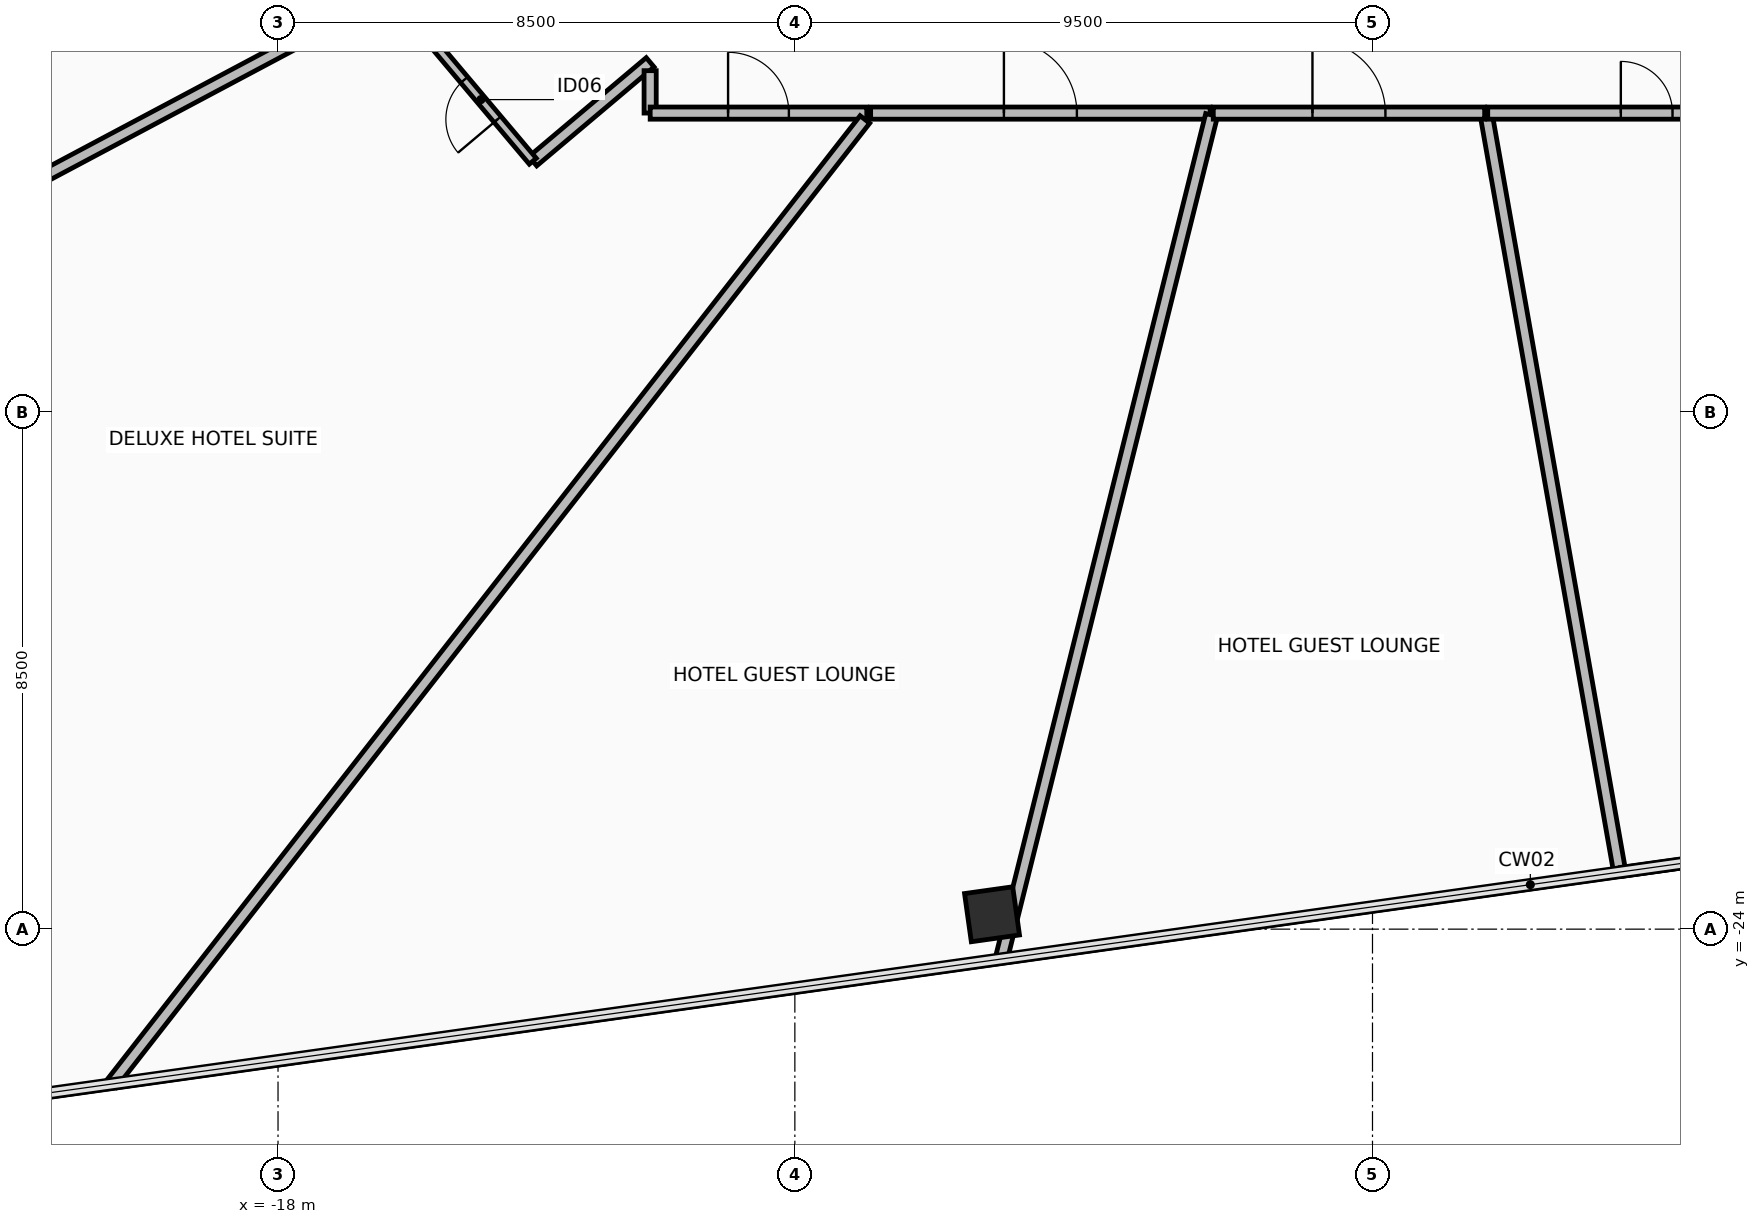
"""IFC4 building model, lengths in metres.
Left out: names, types, materials, properties, quantities, classifications, styles, units other than length and angle.
Written with IfcOpenShell. Run it as: python <this file> out.ifc"""

import sys

from ifc_helpers import new_model, si_unit, direction, frame, frame_2d, origin, origin_2d, place, context, subcontext, project, spatial, rectangle, hollow_rectangle, extrude, element, fill, save


model = new_model("IFC4")
c1 = context("Model", 3, precision=1e-05, world=origin(), true_north=direction((0.0, 1.0)))
c2 = subcontext(c1, "Body", "Model", "MODEL_VIEW")
j1 = project(units=[si_unit("LENGTHUNIT", "METRE"), si_unit("PLANEANGLEUNIT", "RADIAN")], contexts=[c1])
p1 = place(None, origin())
s1 = spatial("IfcSite", under=j1, at=p1, CompositionType="ELEMENT")
p2 = place(p1, origin())
s2 = spatial("IfcBuilding", under=s1, at=p2, CompositionType="ELEMENT")
p3 = place(p2, frame((0.0, 0.0, 77.65)))
s3 = spatial("IfcBuildingStorey", under=s2, at=p3, CompositionType="ELEMENT", Elevation=77.65)
p4 = place(p3, frame((-6.257, -23.755, 0.0), z_axis=(0.0, 0.0, 1.0), x_axis=(0.990268068742, 0.13917310096, 0.0)))
e1 = element("IfcColumn", 1, at=p4, inside=s3, PredefinedType="COLUMN", context=c2, shape_type="SweptSolid", body=[
    extrude(hollow_rectangle(XDim=0.8, YDim=0.8, WallThickness=0.045, at=origin_2d()), origin(), (0.0, 0.0, 1.0), 3.45),
])
p5 = place(p3, frame((-11.88, -9.745, 0.0), z_axis=(0.0, 0.0, 1.0), x_axis=(-0.764712982519, -0.644371053328, 0.0)))
e2 = element("IfcWall", 2, at=p5, inside=s3, PredefinedType="PARTITIONING", context=c2, shape_type="SweptSolid", body=[
    extrude(rectangle(XDim=2.524, YDim=0.2, at=frame_2d((1.262, 0.0))), origin(), (0.0, 0.0, 1.0), 3.21),
])
p6 = place(p3, frame((-13.81, -11.371, 0.0), z_axis=(0.0, 0.0, 1.0), x_axis=(-0.644478981733, 0.764622025647, 0.0)))
e3 = element("IfcWall", 3, at=p6, inside=s3, PredefinedType="PARTITIONING", context=c2, shape_type="SweptSolid", body=[
    extrude(rectangle(XDim=2.65, YDim=0.15, at=frame_2d((1.325, 0.0))), origin(), (0.0, 0.0, 1.0), 2.805),
])
p7 = place(p6, frame((0.9, 0.0, 0.0)))
e4 = element("IfcOpeningElement", 4, at=p7, cuts=e3, PredefinedType="OPENING", context=c2, shape_type="SweptSolid", body=[
    extrude(rectangle(XDim=0.85, YDim=2.1, at=frame_2d((0.425, 1.05))), frame((0.0, 0.085, 0.0), z_axis=(0.0, -1.0, 0.0), x_axis=(1.0, 0.0, 0.0)), (0.0, 0.0, 1.0), 0.17),
])
p8 = place(p3, frame((-11.893, -6.324, 0.0), z_axis=(0.0, 0.0, 1.0), x_axis=(-0.882946043117, -0.469474477416, 0.0)))
e5 = element("IfcWall", 5, at=p8, inside=s3, PredefinedType="PARTITIONING", context=c2, shape_type="SweptSolid", body=[
    extrude(rectangle(XDim=12.747, YDim=0.2, at=frame_2d((6.374, 0.0))), origin(), (0.0, 0.0, 1.0), 2.405),
])
p9 = place(p3, frame((-23.087, -12.156, 0.0), z_axis=(0.0, 0.0, 1.0), x_axis=(0.374605375648, 0.927184346576, 0.0)))
e6 = element("IfcWall", 6, at=p9, inside=s3, PredefinedType="PARTITIONING", context=c2, shape_type="SweptSolid", body=[
    extrude(rectangle(XDim=11.685, YDim=0.15, at=frame_2d((5.842, 0.0))), origin(), (0.0, 0.0, 1.0), 3.21),
])
p10 = place(p3, frame((4.062, -23.038, 0.0), z_axis=(0.0, 0.0, 1.0), x_axis=(-0.173658422676, 0.984805946486, 0.0)))
e7 = element("IfcWall", 7, at=p10, inside=s3, PredefinedType="PARTITIONING", context=c2, shape_type="SweptSolid", body=[
    extrude(rectangle(XDim=12.62, YDim=0.2, at=frame_2d((6.31, 0.0))), origin(), (0.0, 0.0, 1.0), 2.405),
])
p11 = place(p3, frame((1.895, -10.58, 0.0), z_axis=(0.0, 0.0, 1.0), x_axis=(1.0, 0.0, 0.0)))
e8 = element("IfcWall", 8, at=p11, inside=s3, PredefinedType="PARTITIONING", context=c2, shape_type="SweptSolid", body=[
    extrude(rectangle(XDim=5.228, YDim=0.2, at=frame_2d((2.614, 0.0))), origin(), (0.0, 0.0, 1.0), 3.21),
])
p12 = place(p11, frame((2.189, 0.0, 0.0)))
e9 = element("IfcOpeningElement", 9, at=p12, cuts=e8, PredefinedType="OPENING", context=c2, shape_type="SweptSolid", body=[
    extrude(rectangle(XDim=0.85, YDim=2.1, at=frame_2d((0.425, 1.05))), frame((0.0, 0.11, 0.0), z_axis=(0.0, -1.0, 0.0), x_axis=(1.0, 0.0, 0.0)), (0.0, 0.0, 1.0), 0.22),
])
p13 = place(p3, frame((14.445, -21.603, 0.0), z_axis=(0.0, 0.0, 1.0), x_axis=(-0.990270056923, -0.139158953581, 0.0)))
e10 = element("IfcWall", 10, at=p13, inside=s3, PredefinedType="PARTITIONING", context=c2, shape_type="SweptSolid", body=[
    extrude(rectangle(XDim=10.456, YDim=0.15, at=frame_2d((5.228, 0.0))), origin(), (0.0, 0.0, 1.0), 3.21),
])
p14 = place(p3, frame((-11.88, -9.882, 0.0), z_axis=(0.0, 0.0, 1.0), x_axis=(0.0, -1.0, 0.0)))
e11 = element("IfcWall", 11, at=p14, inside=s3, PredefinedType="PARTITIONING", context=c2, shape_type="SweptSolid", body=[
    extrude(rectangle(XDim=0.697, YDim=0.2, at=frame_2d((0.349, 0.0))), origin(), (0.0, 0.0, 1.0), 2.605),
])
p15 = place(p3, frame((-11.879, -10.58, 0.0), z_axis=(0.0, 0.0, 1.0), x_axis=(1.0, 0.0, 0.0)))
e12 = element("IfcWall", 12, at=p15, inside=s3, PredefinedType="PARTITIONING", context=c2, shape_type="SweptSolid", body=[
    extrude(rectangle(XDim=3.562, YDim=0.2, at=frame_2d((1.781, 0.0))), origin(), (0.0, 0.0, 1.0), 2.605),
])
p16 = place(p15, frame((1.281, 0.0, 0.0)))
e13 = element("IfcOpeningElement", 13, at=p16, cuts=e12, PredefinedType="OPENING", context=c2, shape_type="SweptSolid", body=[
    extrude(rectangle(XDim=1.0, YDim=2.15, at=frame_2d((0.5, 1.075))), frame((0.0, 0.11, 0.0), z_axis=(0.0, -1.0, 0.0), x_axis=(1.0, 0.0, 0.0)), (0.0, 0.0, 1.0), 0.22),
])
p17 = place(p3, frame((-8.348, -10.685, 0.0), z_axis=(0.0, 0.0, 1.0), x_axis=(-0.615661230884, -0.788010944585, 0.0)))
e14 = element("IfcWall", 14, at=p17, inside=s3, PredefinedType="PARTITIONING", context=c2, shape_type="SweptSolid", body=[
    extrude(rectangle(XDim=20.121, YDim=0.2, at=frame_2d((10.06, 0.0))), origin(), (0.0, 0.0, 1.0), 2.405),
])
p18 = place(p3, frame((-8.254, -10.58, 0.0), z_axis=(0.0, 0.0, 1.0), x_axis=(1.0, 0.0, 0.0)))
e15 = element("IfcWall", 15, at=p18, inside=s3, PredefinedType="PARTITIONING", context=c2, shape_type="SweptSolid", body=[
    extrude(rectangle(XDim=5.584, YDim=0.2, at=frame_2d((2.792, 0.0))), origin(), (0.0, 0.0, 1.0), 2.605),
])
p19 = place(p18, frame((2.192, 0.0, 0.0)))
e16 = element("IfcOpeningElement", 16, at=p19, cuts=e15, PredefinedType="OPENING", context=c2, shape_type="SweptSolid", body=[
    extrude(rectangle(XDim=1.2, YDim=2.15, at=frame_2d((0.6, 1.075))), frame((0.0, 0.11, 0.0), z_axis=(0.0, -1.0, 0.0), x_axis=(1.0, 0.0, 0.0)), (0.0, 0.0, 1.0), 0.22),
])
p20 = place(p3, frame((-2.646, -10.611, 0.0), z_axis=(0.0, 0.0, 1.0), x_axis=(-0.241928502378, -0.970294078997, 0.0)))
e17 = element("IfcWall", 17, at=p20, inside=s3, PredefinedType="PARTITIONING", context=c2, shape_type="SweptSolid", body=[
    extrude(rectangle(XDim=14.289, YDim=0.2, at=frame_2d((7.144, 0.0))), origin(), (0.0, 0.0, 1.0), 2.405),
])
p21 = place(p3, frame((-2.618, -10.58, 0.0), z_axis=(0.0, 0.0, 1.0), x_axis=(1.0, 0.0, 0.0)))
e18 = element("IfcWall", 18, at=p21, inside=s3, PredefinedType="PARTITIONING", context=c2, shape_type="SweptSolid", body=[
    extrude(rectangle(XDim=4.463, YDim=0.2, at=frame_2d((2.231, 0.0))), origin(), (0.0, 0.0, 1.0), 3.21),
])
p22 = place(p21, frame((1.631, 0.0, 0.0)))
e19 = element("IfcOpeningElement", 19, at=p22, cuts=e18, PredefinedType="OPENING", context=c2, shape_type="SweptSolid", body=[
    extrude(rectangle(XDim=1.2, YDim=2.15, at=frame_2d((0.6, 1.075))), frame((0.0, 0.11, 0.0), z_axis=(0.0, -1.0, 0.0), x_axis=(1.0, 0.0, 0.0)), (0.0, 0.0, 1.0), 0.22),
])
p23 = place(p7, origin())
e20 = element("IfcDoor", 20, at=p23, inside=s3, OperationType="SINGLE_SWING_RIGHT", PredefinedType="DOOR", context=c2, shape_type="SweptSolid", body=[
    extrude(rectangle(XDim=0.85, YDim=2.1, at=frame_2d((0.425, 1.05))), frame((0.0, 0.025, 0.0), z_axis=(0.0, -1.0, 0.0), x_axis=(1.0, 0.0, 0.0)), (0.0, 0.0, 1.0), 0.05),
])
fill(e4, e20)
p24 = place(p12, origin())
e21 = element("IfcDoor", 21, at=p24, inside=s3, OperationType="SINGLE_SWING_RIGHT", PredefinedType="DOOR", context=c2, shape_type="SweptSolid", body=[
    extrude(rectangle(XDim=0.85, YDim=2.1, at=frame_2d((0.425, 1.05))), frame((0.0, 0.025, 0.0), z_axis=(0.0, -1.0, 0.0), x_axis=(1.0, 0.0, 0.0)), (0.0, 0.0, 1.0), 0.05),
])
fill(e9, e21)
p25 = place(p16, origin())
e22 = element("IfcDoor", 22, at=p25, inside=s3, OperationType="SINGLE_SWING_LEFT", PredefinedType="DOOR", context=c2, shape_type="SweptSolid", body=[
    extrude(rectangle(XDim=1.0, YDim=2.15, at=frame_2d((0.5, 1.075))), frame((0.0, 0.025, 0.0), z_axis=(0.0, -1.0, 0.0), x_axis=(1.0, 0.0, 0.0)), (0.0, 0.0, 1.0), 0.05),
])
fill(e13, e22)
p26 = place(p19, origin())
e23 = element("IfcDoor", 23, at=p26, inside=s3, OperationType="SINGLE_SWING_LEFT", PredefinedType="DOOR", context=c2, shape_type="SweptSolid", body=[
    extrude(rectangle(XDim=1.2, YDim=2.15, at=frame_2d((0.6, 1.075))), frame((0.0, 0.025, 0.0), z_axis=(0.0, -1.0, 0.0), x_axis=(1.0, 0.0, 0.0)), (0.0, 0.0, 1.0), 0.05),
])
fill(e16, e23)
p27 = place(p22, origin())
e24 = element("IfcDoor", 24, at=p27, inside=s3, OperationType="SINGLE_SWING_LEFT", PredefinedType="DOOR", context=c2, shape_type="SweptSolid", body=[
    extrude(rectangle(XDim=1.2, YDim=2.15, at=frame_2d((0.6, 1.075))), frame((0.0, 0.025, 0.0), z_axis=(0.0, -1.0, 0.0), x_axis=(1.0, 0.0, 0.0)), (0.0, 0.0, 1.0), 0.05),
])
fill(e19, e24)
save(model, sys.argv[1])
